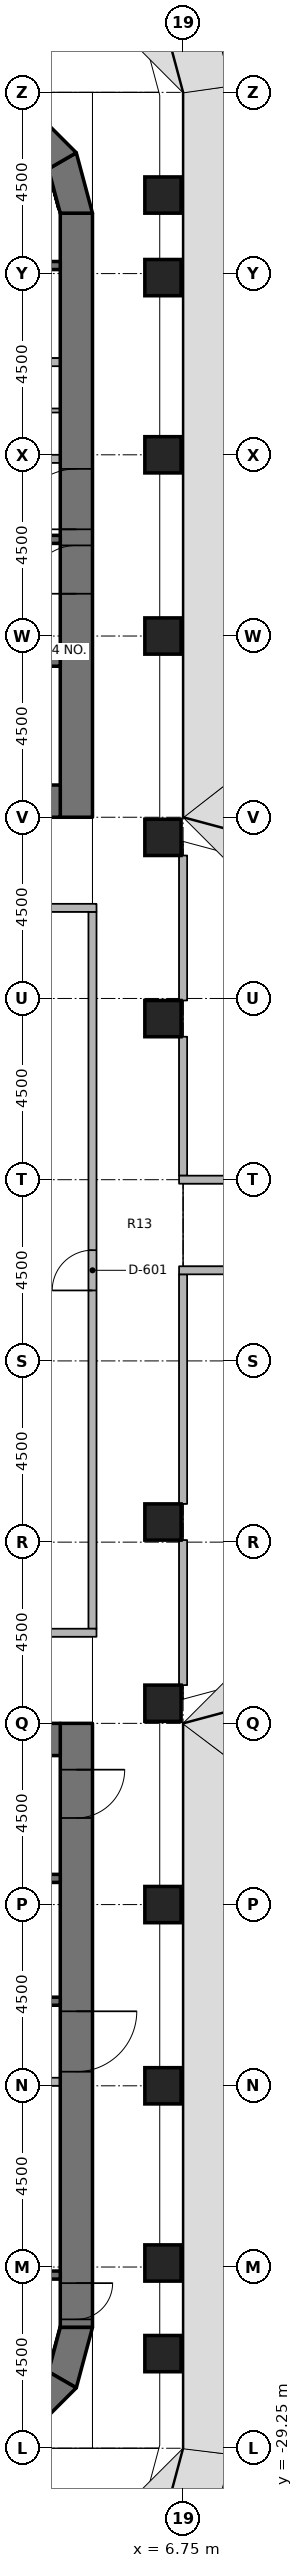
"""IFC4 building model, lengths in metres.
Left out: names, types, materials, properties, quantities, classifications, styles, units other than length and angle.
Written with IfcOpenShell. Run it as: python <this file> out.ifc"""

import sys

from ifc_helpers import new_model, si_unit, direction, frame, frame_2d, origin, origin_2d, place, context, subcontext, project, spatial, polyline, rectangle, outline, extrude, element, fill, save


model = new_model("IFC4")
c1 = context("Model", 3, precision=1e-05, world=origin(), true_north=direction((0.0, 1.0)))
c2 = subcontext(c1, "Body", "Model", "MODEL_VIEW")
j1 = project(units=[si_unit("LENGTHUNIT", "METRE"), si_unit("PLANEANGLEUNIT", "RADIAN")], contexts=[c1])
p1 = place(None, origin())
s1 = spatial("IfcSite", under=j1, at=p1, CompositionType="ELEMENT")
p2 = place(p1, origin())
s2 = spatial("IfcBuilding", under=s1, at=p2, CompositionType="ELEMENT")
p3 = place(p2, frame((0.0, 0.0, 86.6)))
s3 = spatial("IfcBuildingStorey", under=s2, at=p3, CompositionType="ELEMENT", Elevation=86.6)
for number, where, z_axis, x_axis in (
    (1, (6.25, -26.9, 0.0), (0.0, 0.0, 1.0), (1.0, 0.0, 0.0)),
    (2, (6.25, -24.65, 0.0), (0.0, 0.0, 1.0), (1.0, 0.0, 0.0)),
    (3, (6.25, -20.25, 0.0), (0.0, 0.0, 1.0), (1.0, 0.0, 0.0)),
    (4, (6.25, -15.75, 0.0), (0.0, 0.0, 1.0), (1.0, 0.0, 0.0)),
    (5, (6.25, -10.75, 0.0), (0.0, 0.0, 1.0), (1.0, 0.0, 0.0)),
    (6, (6.25, -6.25, 0.0), (0.0, 0.0, 1.0), (1.0, 0.0, 0.0)),
    (7, (6.25, 6.25, 0.0), (0.0, 0.0, 1.0), (1.0, 0.0, 0.0)),
    (8, (6.25, 10.75, 0.0), (0.0, 0.0, 1.0), (1.0, 0.0, 0.0)),
    (9, (6.25, 15.75, 0.0), (0.0, 0.0, 1.0), (1.0, 0.0, 0.0)),
    (10, (6.25, 20.25, 0.0), (0.0, 0.0, 1.0), (1.0, 0.0, 0.0)),
    (11, (6.25, 24.65, 0.0), (0.0, 0.0, 1.0), (1.0, 0.0, 0.0)),
    (12, (6.25, 26.7, 0.0), (0.0, 0.0, 1.0), (1.0, 0.0, 0.0)),
):
    element("IfcColumn", number, at=place(p3, frame(where, z_axis=z_axis, x_axis=x_axis)), inside=s3, PredefinedType="COLUMN", context=c2, shape_type="SweptSolid", body=[
        extrude(rectangle(XDim=0.9, YDim=0.9, at=origin_2d()), origin(), (0.0, 0.0, 1.0), 3.65),
    ])
p4 = place(p3, frame((4.1, 11.25, 0.0), z_axis=(0.0, 0.0, 1.0), x_axis=(0.0, 1.0, 0.0)))
e13 = element("IfcWall", 13, at=p4, inside=s3, PredefinedType="SHEAR", context=c2, shape_type="SweptSolid", body=[
    extrude(rectangle(XDim=15.0, YDim=0.8, at=frame_2d((7.5, 0.0))), origin(), (0.0, 0.0, 1.0), 3.8),
])
p5 = place(p4, frame((7.15, 0.0, 0.0)))
e14 = element("IfcOpeningElement", 14, at=p5, cuts=e13, PredefinedType="OPENING", context=c2, shape_type="SweptSolid", body=[
    extrude(rectangle(XDim=1.5, YDim=2.3, at=frame_2d((0.75, 1.15))), frame((0.0, 0.41, 0.0), z_axis=(0.0, -1.0, 0.0), x_axis=(1.0, 0.0, 0.0)), (0.0, 0.0, 1.0), 0.82),
])
p6 = place(p4, frame((5.55, 0.0, 0.0)))
e15 = element("IfcOpeningElement", 15, at=p6, cuts=e13, PredefinedType="OPENING", context=c2, shape_type="SweptSolid", body=[
    extrude(rectangle(XDim=1.2, YDim=2.1, at=frame_2d((0.6, 1.05))), frame((0.0, 0.41, 0.0), z_axis=(0.0, -1.0, 0.0), x_axis=(1.0, 0.0, 0.0)), (0.0, 0.0, 1.0), 0.82),
])
p7 = place(p3, frame((-3.7, 11.65, 0.0), z_axis=(0.0, 0.0, 1.0), x_axis=(1.0, 0.0, 0.0)))
e16 = element("IfcWall", 16, at=p7, inside=s3, PredefinedType="SHEAR", context=c2, shape_type="SweptSolid", body=[
    extrude(rectangle(XDim=7.4, YDim=0.8, at=frame_2d((3.7, 0.0))), origin(), (0.0, 0.0, 1.0), 3.8),
])
p8 = place(p3, origin())
e17 = element("IfcWall", 17, at=p8, inside=s3, PredefinedType="SHEAR", context=c2, shape_type="SweptSolid", body=[
    extrude(outline(polyline([(4.5, 26.25), (4.098, 27.75), (3.405, 27.35), (3.7, 26.25), (4.5, 26.25)])), origin(), (0.0, 0.0, 1.0), 3.8),
])
p9 = place(p3, origin())
e18 = element("IfcWall", 18, at=p9, inside=s3, PredefinedType="SHEAR", context=c2, shape_type="SweptSolid", body=[
    extrude(outline(polyline([(4.098, 27.75), (3.0, 28.848), (2.6, 28.155), (3.405, 27.35), (4.098, 27.75)])), origin(), (0.0, 0.0, 1.0), 3.8),
])
p10 = place(p3, frame((4.1, -11.25, 0.0), z_axis=(0.0, 0.0, 1.0), x_axis=(0.0, -1.0, 0.0)))
e19 = element("IfcWall", 19, at=p10, inside=s3, PredefinedType="SHEAR", context=c2, shape_type="SweptSolid", body=[
    extrude(rectangle(XDim=15.0, YDim=0.8, at=frame_2d((7.5, 0.0))), origin(), (0.0, 0.0, 1.0), 3.8),
])
p11 = place(p10, frame((7.15, 0.0, 0.0)))
e20 = element("IfcOpeningElement", 20, at=p11, cuts=e19, PredefinedType="OPENING", context=c2, shape_type="SweptSolid", body=[
    extrude(rectangle(XDim=1.5, YDim=2.3, at=frame_2d((0.75, 1.15))), frame((0.0, 0.41, 0.0), z_axis=(0.0, -1.0, 0.0), x_axis=(1.0, 0.0, 0.0)), (0.0, 0.0, 1.0), 0.82),
])
p12 = place(p10, frame((13.9, 0.0, 0.0)))
e21 = element("IfcOpeningElement", 21, at=p12, cuts=e19, PredefinedType="OPENING", context=c2, shape_type="SweptSolid", body=[
    extrude(rectangle(XDim=0.9, YDim=2.1, at=frame_2d((0.45, 1.05))), frame((0.0, 0.41, 0.0), z_axis=(0.0, -1.0, 0.0), x_axis=(1.0, 0.0, 0.0)), (0.0, 0.0, 1.0), 0.82),
])
p13 = place(p10, frame((1.15, 0.0, 0.0)))
e22 = element("IfcOpeningElement", 22, at=p13, cuts=e19, PredefinedType="OPENING", context=c2, shape_type="SweptSolid", body=[
    extrude(rectangle(XDim=1.2, YDim=2.1, at=frame_2d((0.6, 1.05))), frame((0.0, 0.41, 0.0), z_axis=(0.0, -1.0, 0.0), x_axis=(1.0, 0.0, 0.0)), (0.0, 0.0, 1.0), 0.82),
])
p14 = place(p3, frame((-3.7, -11.65, 0.0), z_axis=(0.0, 0.0, 1.0), x_axis=(1.0, 0.0, 0.0)))
e23 = element("IfcWall", 23, at=p14, inside=s3, PredefinedType="SHEAR", context=c2, shape_type="SweptSolid", body=[
    extrude(rectangle(XDim=7.4, YDim=0.8, at=frame_2d((3.7, 0.0))), origin(), (0.0, 0.0, 1.0), 3.8),
])
p15 = place(p3, origin())
e24 = element("IfcWall", 24, at=p15, inside=s3, PredefinedType="SHEAR", context=c2, shape_type="SweptSolid", body=[
    extrude(outline(polyline([(4.5, -26.25), (4.098, -27.75), (3.405, -27.35), (3.7, -26.25), (4.5, -26.25)])), origin(), (0.0, 0.0, 1.0), 3.8),
])
p16 = place(p3, origin())
e25 = element("IfcWall", 25, at=p16, inside=s3, PredefinedType="SHEAR", context=c2, shape_type="SweptSolid", body=[
    extrude(outline(polyline([(4.098, -27.75), (3.0, -28.848), (2.6, -28.155), (3.405, -27.35), (4.098, -27.75)])), origin(), (0.0, 0.0, 1.0), 3.8),
])
for number, where, z_axis, x_axis in (
    (26, (-3.7, 24.95, 0.0), (0.0, 0.0, 1.0), (1.0, 0.0, 0.0)),
    (27, (-3.7, 18.15, 0.0), (0.0, 0.0, 1.0), (1.0, 0.0, 0.0)),
    (28, (-3.7, 15.1, 0.0), (0.0, 0.0, 1.0), (1.0, 0.0, 0.0)),
):
    element("IfcWall", number, at=place(p3, frame(where, z_axis=z_axis, x_axis=x_axis)), inside=s3, PredefinedType="SHEAR", context=c2, shape_type="SweptSolid", body=[
        extrude(rectangle(XDim=7.4, YDim=0.2, at=frame_2d((3.7, 0.0))), origin(), (0.0, 0.0, 1.0), 3.65),
    ])
p17 = place(p3, frame((0.9, 20.15, 0.0), z_axis=(0.0, 0.0, 1.0), x_axis=(1.0, 0.0, 0.0)))
e29 = element("IfcWall", 29, at=p17, inside=s3, PredefinedType="PARTITIONING", context=c2, shape_type="SweptSolid", body=[
    extrude(rectangle(XDim=2.8, YDim=0.2, at=frame_2d((1.4, 0.0))), origin(), (0.0, 0.0, 1.0), 3.65),
])
p18 = place(p3, frame((1.1, 22.55, 0.0), z_axis=(0.0, 0.0, 1.0), x_axis=(1.0, 0.0, 0.0)))
e30 = element("IfcWall", 30, at=p18, inside=s3, PredefinedType="PARTITIONING", context=c2, shape_type="SweptSolid", body=[
    extrude(rectangle(XDim=2.6, YDim=0.2, at=frame_2d((1.3, 0.0))), origin(), (0.0, 0.0, 1.0), 3.65),
])
p19 = place(p3, frame((1.1, 21.35, 0.0), z_axis=(0.0, 0.0, 1.0), x_axis=(1.0, 0.0, 0.0)))
e31 = element("IfcWall", 31, at=p19, inside=s3, PredefinedType="PARTITIONING", context=c2, shape_type="SweptSolid", body=[
    extrude(rectangle(XDim=2.6, YDim=0.1, at=frame_2d((1.3, 0.0))), origin(), (0.0, 0.0, 1.0), 3.65),
])
for number, where, z_axis, x_axis in (
    (32, (3.7, -24.95, 0.0), (0.0, 0.0, 1.0), (-1.0, 0.0, 0.0)),
    (33, (3.7, -18.15, 0.0), (0.0, 0.0, 1.0), (-1.0, 0.0, 0.0)),
    (34, (3.7, -15.1, 0.0), (0.0, 0.0, 1.0), (-1.0, 0.0, 0.0)),
):
    element("IfcWall", number, at=place(p3, frame(where, z_axis=z_axis, x_axis=x_axis)), inside=s3, PredefinedType="SHEAR", context=c2, shape_type="SweptSolid", body=[
        extrude(rectangle(XDim=7.4, YDim=0.2, at=frame_2d((3.7, 0.0))), origin(), (0.0, 0.0, 1.0), 3.65),
    ])
p20 = place(p3, frame((3.7, -20.15, 0.0), z_axis=(0.0, 0.0, 1.0), x_axis=(-1.0, 0.0, 0.0)))
e35 = element("IfcWall", 35, at=p20, inside=s3, PredefinedType="PARTITIONING", context=c2, shape_type="SweptSolid", body=[
    extrude(rectangle(XDim=2.8, YDim=0.2, at=frame_2d((1.4, 0.0))), origin(), (0.0, 0.0, 1.0), 3.65),
])
p21 = place(p3, frame((4.5, -8.9, 0.0), z_axis=(0.0, 0.0, 1.0), x_axis=(0.0, 1.0, 0.0)))
e36 = element("IfcWall", 36, at=p21, inside=s3, PredefinedType="PARTITIONING", context=c2, shape_type="SweptSolid", body=[
    extrude(rectangle(XDim=17.8, YDim=0.2, at=frame_2d((8.9, 0.0))), origin(), (0.0, 0.0, 1.0), 2.738),
])
p22 = place(p21, frame((8.4, 0.0, 0.0)))
e37 = element("IfcOpeningElement", 37, at=p22, cuts=e36, PredefinedType="OPENING", context=c2, shape_type="SweptSolid", body=[
    extrude(rectangle(XDim=1.0, YDim=2.1, at=frame_2d((0.5, 1.05))), frame((0.0, 0.11, 0.0), z_axis=(0.0, -1.0, 0.0), x_axis=(1.0, 0.0, 0.0)), (0.0, 0.0, 1.0), 0.22),
])
p23 = place(p3, frame((6.75, 2.35, 0.0), z_axis=(0.0, 0.0, 1.0), x_axis=(0.0, 1.0, 0.0)))
e38 = element("IfcWall", 38, at=p23, inside=s3, PredefinedType="PARTITIONING", context=c2, shape_type="SweptSolid", body=[
    extrude(rectangle(XDim=3.45, YDim=0.2, at=frame_2d((1.725, 0.0))), origin(), (0.0, 0.0, 1.0), 2.738),
])
for number, where, z_axis, x_axis in (
    (39, (6.75, 6.7, 0.0), (0.0, 0.0, 1.0), (0.0, 1.0, 0.0)),
    (40, (6.75, -10.3, 0.0), (0.0, 0.0, 1.0), (0.0, 1.0, 0.0)),
):
    element("IfcWall", number, at=place(p3, frame(where, z_axis=z_axis, x_axis=x_axis)), inside=s3, PredefinedType="PARTITIONING", context=c2, shape_type="SweptSolid", body=[
        extrude(rectangle(XDim=3.6, YDim=0.2, at=frame_2d((1.8, 0.0))), origin(), (0.0, 0.0, 1.0), 2.738),
    ])
p24 = place(p3, frame((6.75, -5.8, 0.0), z_axis=(0.0, 0.0, 1.0), x_axis=(0.0, 1.0, 0.0)))
e41 = element("IfcWall", 41, at=p24, inside=s3, PredefinedType="PARTITIONING", context=c2, shape_type="SweptSolid", body=[
    extrude(rectangle(XDim=5.7, YDim=0.2, at=frame_2d((2.85, 0.0))), origin(), (0.0, 0.0, 1.0), 2.738),
])
for number, where, z_axis, x_axis in (
    (42, (-0.1, 9.0, 0.0), (0.0, 0.0, 1.0), (1.0, 0.0, 0.0)),
    (43, (-0.1, -9.0, 0.0), (0.0, 0.0, 1.0), (1.0, 0.0, 0.0)),
):
    element("IfcWall", number, at=place(p3, frame(where, z_axis=z_axis, x_axis=x_axis)), inside=s3, PredefinedType="PARTITIONING", context=c2, shape_type="SweptSolid", body=[
        extrude(rectangle(XDim=4.7, YDim=0.2, at=frame_2d((2.35, 0.0))), origin(), (0.0, 0.0, 1.0), 2.738),
    ])
p25 = place(p3, frame((6.65, 2.25, 0.0), z_axis=(0.0, 0.0, 1.0), x_axis=(1.0, 0.0, 0.0)))
e44 = element("IfcWall", 44, at=p25, inside=s3, PredefinedType="PARTITIONING", context=c2, shape_type="SweptSolid", body=[
    extrude(rectangle(XDim=4.7, YDim=0.2, at=frame_2d((2.35, 0.0))), origin(), (0.0, 0.0, 1.0), 2.738),
])
p26 = place(p25, frame((1.85, 0.0, 0.0)))
e45 = element("IfcOpeningElement", 45, at=p26, cuts=e44, PredefinedType="OPENING", context=c2, shape_type="SweptSolid", body=[
    extrude(rectangle(XDim=1.0, YDim=2.1, at=frame_2d((0.5, 1.05))), frame((0.0, 0.11, 0.0), z_axis=(0.0, -1.0, 0.0), x_axis=(1.0, 0.0, 0.0)), (0.0, 0.0, 1.0), 0.22),
])
p27 = place(p3, frame((11.35, 0.0, 0.0), z_axis=(0.0, 0.0, 1.0), x_axis=(-1.0, 0.0, 0.0)))
e46 = element("IfcWall", 46, at=p27, inside=s3, PredefinedType="PARTITIONING", context=c2, shape_type="SweptSolid", body=[
    extrude(rectangle(XDim=4.7, YDim=0.2, at=frame_2d((2.35, 0.0))), origin(), (0.0, 0.0, 1.0), 2.738),
])
p28 = place(p27, frame((1.85, 0.0, 0.0)))
e47 = element("IfcOpeningElement", 47, at=p28, cuts=e46, PredefinedType="OPENING", context=c2, shape_type="SweptSolid", body=[
    extrude(rectangle(XDim=1.0, YDim=2.1, at=frame_2d((0.5, 1.05))), frame((0.0, 0.11, 0.0), z_axis=(0.0, -1.0, 0.0), x_axis=(1.0, 0.0, 0.0)), (0.0, 0.0, 1.0), 0.22),
])
p29 = place(p5, origin())
e48 = element("IfcDoor", 48, at=p29, inside=s3, OperationType="DOUBLE_DOOR_SINGLE_SWING", PredefinedType="DOOR", context=c2, shape_type="SweptSolid", body=[
    extrude(rectangle(XDim=1.5, YDim=2.3, at=frame_2d((0.75, 1.15))), frame((0.0, 0.025, 0.0), z_axis=(0.0, -1.0, 0.0), x_axis=(1.0, 0.0, 0.0)), (0.0, 0.0, 1.0), 0.05),
])
fill(e14, e48)
p30 = place(p6, origin())
e49 = element("IfcDoor", 49, at=p30, inside=s3, OperationType="SINGLE_SWING_LEFT", PredefinedType="DOOR", context=c2, shape_type="SweptSolid", body=[
    extrude(rectangle(XDim=1.2, YDim=2.1, at=frame_2d((0.6, 1.05))), frame((0.0, 0.025, 0.0), z_axis=(0.0, -1.0, 0.0), x_axis=(1.0, 0.0, 0.0)), (0.0, 0.0, 1.0), 0.05),
])
fill(e15, e49)
p31 = place(p11, origin())
e50 = element("IfcDoor", 50, at=p31, inside=s3, OperationType="DOUBLE_DOOR_SINGLE_SWING", PredefinedType="DOOR", context=c2, shape_type="SweptSolid", body=[
    extrude(rectangle(XDim=1.5, YDim=2.3, at=frame_2d((0.75, 1.15))), frame((0.0, 0.025, 0.0), z_axis=(0.0, -1.0, 0.0), x_axis=(1.0, 0.0, 0.0)), (0.0, 0.0, 1.0), 0.05),
])
fill(e20, e50)
p32 = place(p12, origin())
e51 = element("IfcDoor", 51, at=p32, inside=s3, OperationType="SINGLE_SWING_LEFT", PredefinedType="DOOR", context=c2, shape_type="SweptSolid", body=[
    extrude(rectangle(XDim=0.9, YDim=2.1, at=frame_2d((0.45, 1.05))), frame((0.0, 0.025, 0.0), z_axis=(0.0, -1.0, 0.0), x_axis=(1.0, 0.0, 0.0)), (0.0, 0.0, 1.0), 0.05),
])
fill(e21, e51)
p33 = place(p13, origin())
e52 = element("IfcDoor", 52, at=p33, inside=s3, OperationType="SINGLE_SWING_LEFT", PredefinedType="DOOR", context=c2, shape_type="SweptSolid", body=[
    extrude(rectangle(XDim=1.2, YDim=2.1, at=frame_2d((0.6, 1.05))), frame((0.0, 0.025, 0.0), z_axis=(0.0, -1.0, 0.0), x_axis=(1.0, 0.0, 0.0)), (0.0, 0.0, 1.0), 0.05),
])
fill(e22, e52)
p34 = place(p22, origin())
e53 = element("IfcDoor", 53, at=p34, inside=s3, OperationType="SINGLE_SWING_RIGHT", PredefinedType="DOOR", context=c2, shape_type="SweptSolid", body=[
    extrude(rectangle(XDim=1.0, YDim=2.1, at=frame_2d((0.5, 1.05))), frame((0.0, 0.025, 0.0), z_axis=(0.0, -1.0, 0.0), x_axis=(1.0, 0.0, 0.0)), (0.0, 0.0, 1.0), 0.05),
])
fill(e37, e53)
save(model, sys.argv[1])
